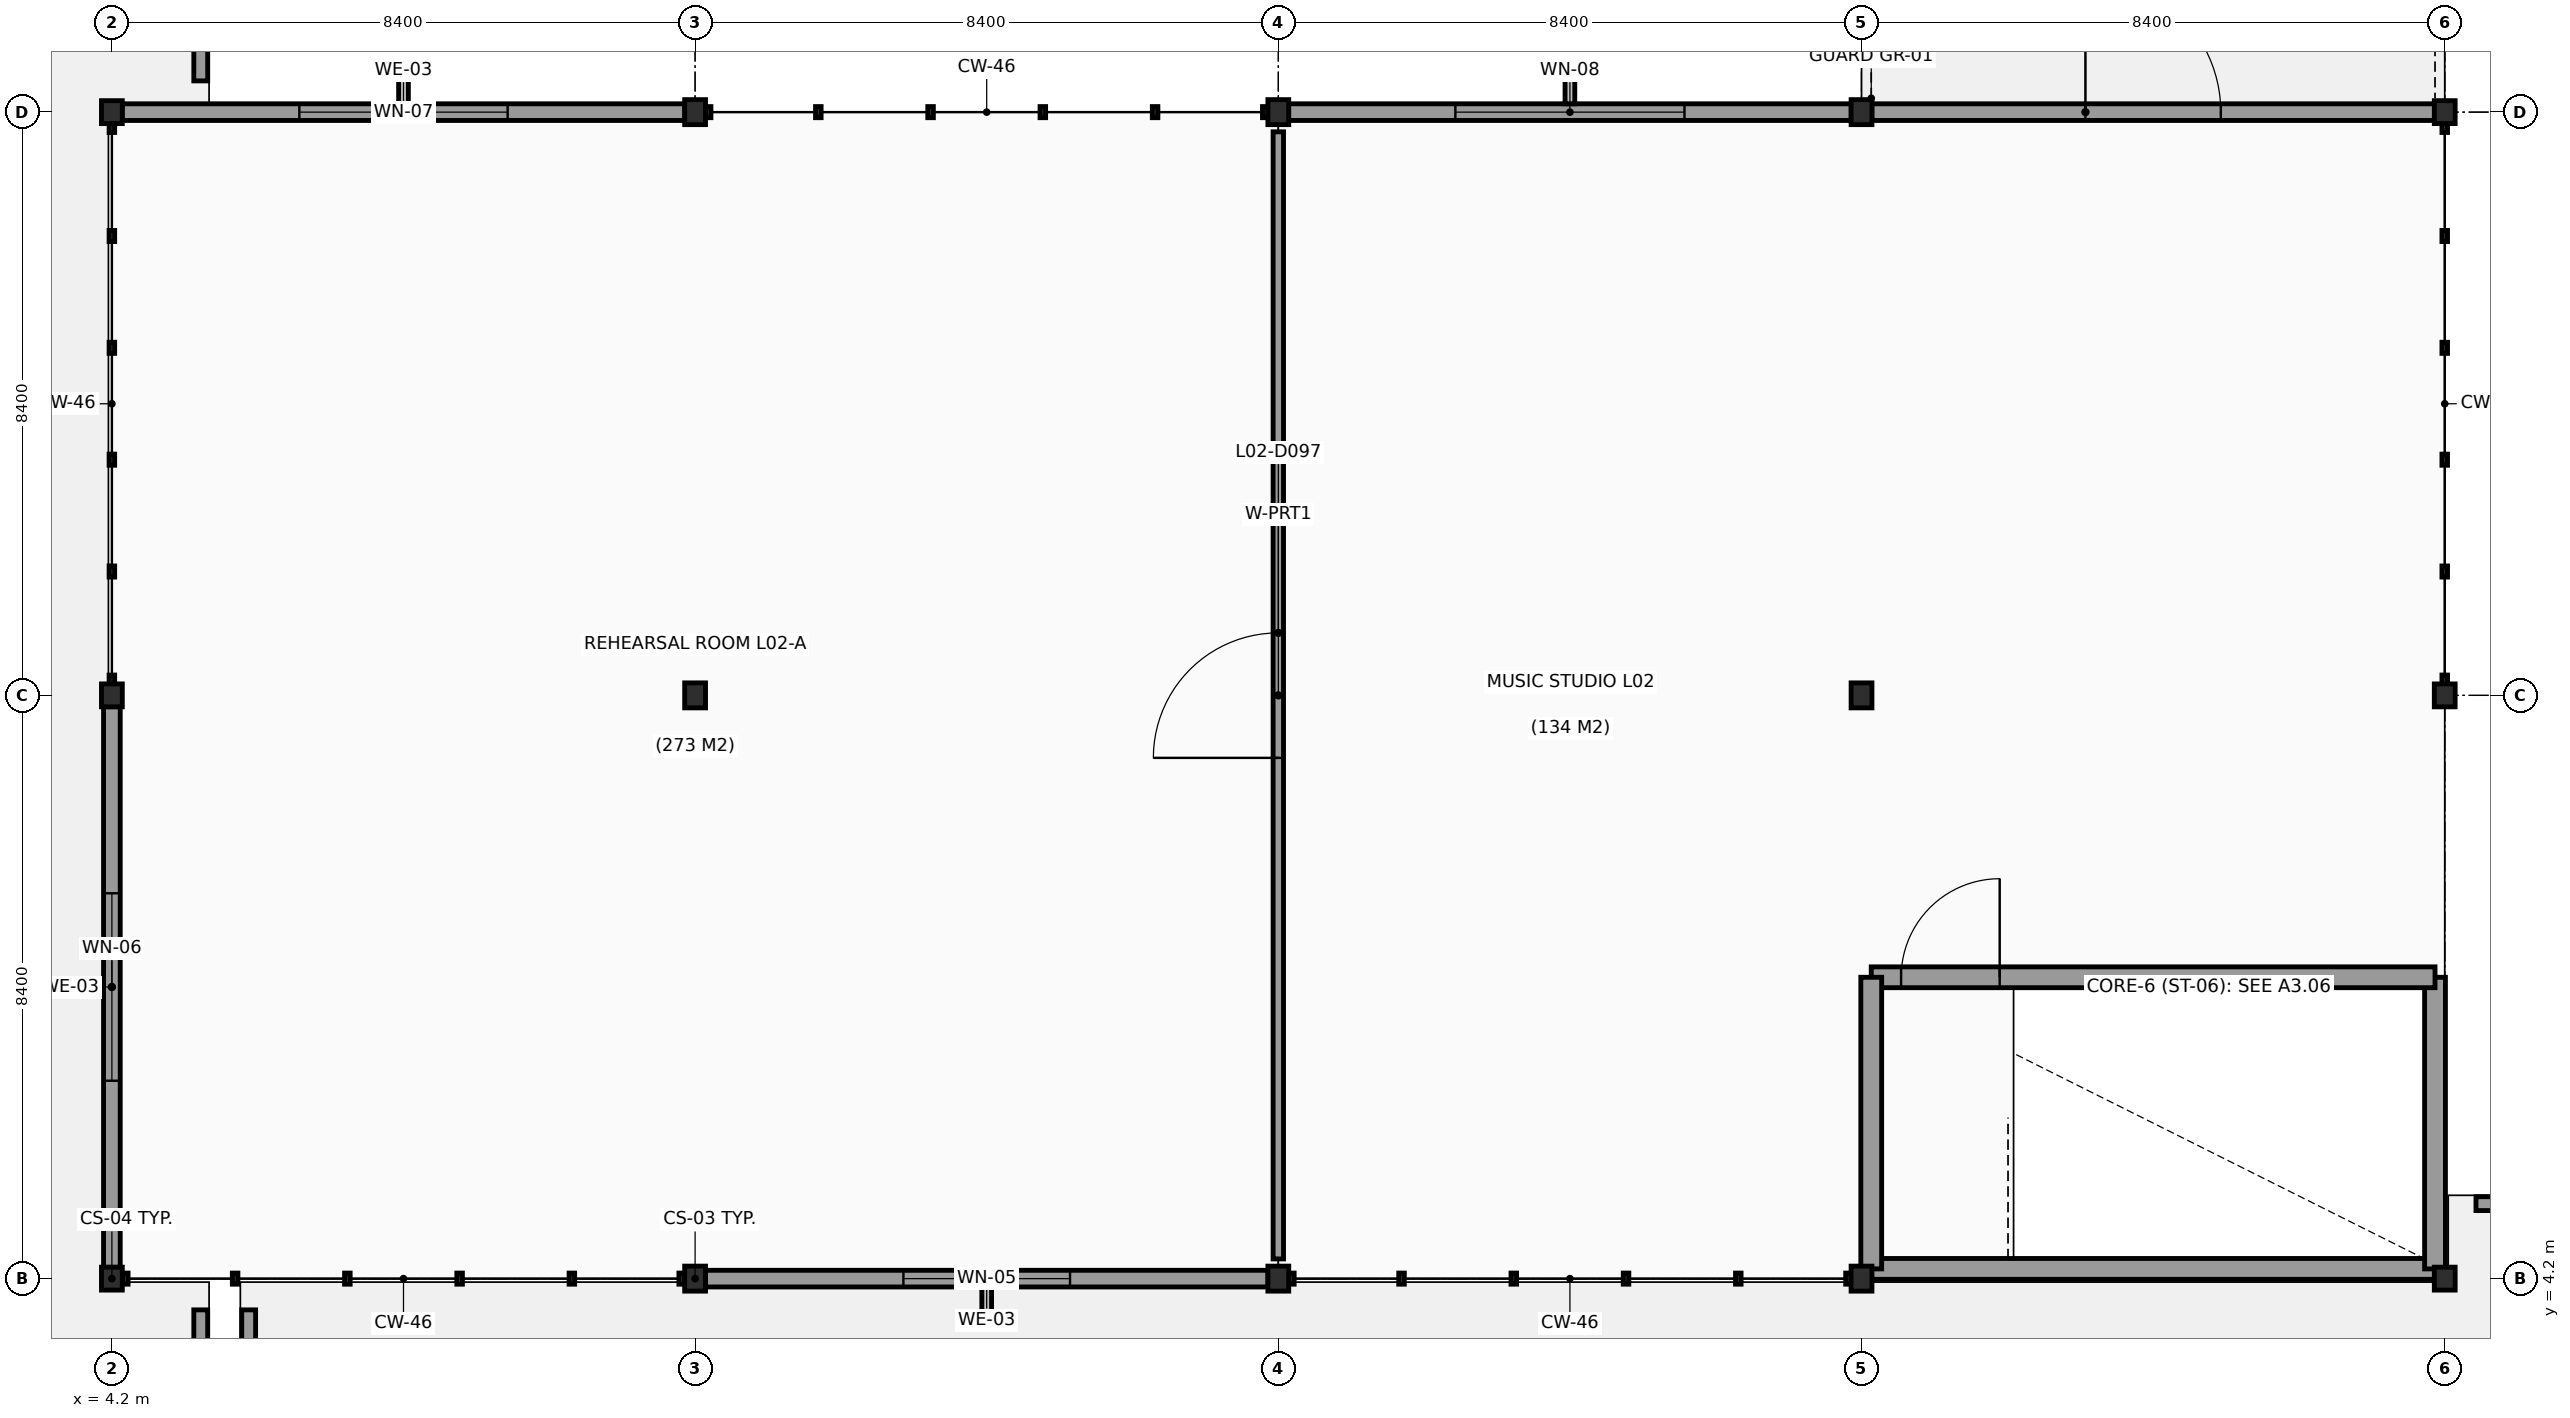
"""IFC4 building model, lengths in metres.
Left out: names, types, materials, properties, quantities, classifications, styles, units other than length and angle.
Written with IfcOpenShell. Run it as: python <this file> out.ifc"""

import sys

from ifc_helpers import new_model, si_unit, direction, frame, frame_2d, origin, origin_2d, place, context, subcontext, project, spatial, rectangle, i_section, extrude, element, fill, save


model = new_model("IFC4")
c1 = context("Model", 3, precision=1e-05, world=origin(), true_north=direction((0.0, 1.0)))
c2 = subcontext(c1, "Body", "Model", "MODEL_VIEW")
j1 = project(units=[si_unit("LENGTHUNIT", "METRE"), si_unit("PLANEANGLEUNIT", "RADIAN")], contexts=[c1])
p1 = place(None, origin())
s1 = spatial("IfcSite", under=j1, at=p1, CompositionType="ELEMENT")
p2 = place(p1, origin())
s2 = spatial("IfcBuilding", under=s1, at=p2, CompositionType="ELEMENT")
p3 = place(p2, frame((0.0, 0.0, 7.8)))
s3 = spatial("IfcBuildingStorey", under=s2, at=p3, CompositionType="ELEMENT", Elevation=7.8)
for number, where, z_axis, x_axis in (
    (1, (4.2, 4.2, 0.0), (0.0, 0.0, 1.0), (1.0, 0.0, 0.0)),
    (2, (4.2, 12.6, 0.0), (0.0, 0.0, 1.0), (1.0, 0.0, 0.0)),
    (3, (4.2, 21.0, 0.0), (0.0, 0.0, 1.0), (1.0, 0.0, 0.0)),
):
    element("IfcColumn", number, at=place(p3, frame(where, z_axis=z_axis, x_axis=x_axis)), inside=s3, PredefinedType="COLUMN", context=c2, shape_type="SweptSolid", body=[
        extrude(i_section(OverallWidth=0.3, OverallDepth=0.33, WebThickness=0.01, FlangeThickness=0.017, FilletRadius=0.027, at=origin_2d()), origin(), (0.0, 0.0, 1.0), 3.34),
    ])
for number, where, z_axis, x_axis in (
    (4, (12.6, 4.2, 0.0), (0.0, 0.0, 1.0), (1.0, 0.0, 0.0)),
    (5, (12.6, 12.6, 0.0), (0.0, 0.0, 1.0), (1.0, 0.0, 0.0)),
    (6, (12.6, 21.0, 0.0), (0.0, 0.0, 1.0), (1.0, 0.0, 0.0)),
    (7, (21.0, 4.2, 0.0), (0.0, 0.0, 1.0), (1.0, 0.0, 0.0)),
    (8, (21.0, 21.0, 0.0), (0.0, 0.0, 1.0), (1.0, 0.0, 0.0)),
    (9, (29.4, 4.2, 0.0), (0.0, 0.0, 1.0), (1.0, 0.0, 0.0)),
    (10, (29.4, 12.6, 0.0), (0.0, 0.0, 1.0), (1.0, 0.0, 0.0)),
    (11, (29.4, 21.0, 0.0), (0.0, 0.0, 1.0), (1.0, 0.0, 0.0)),
):
    element("IfcColumn", number, at=place(p3, frame(where, z_axis=z_axis, x_axis=x_axis)), inside=s3, PredefinedType="COLUMN", context=c2, shape_type="SweptSolid", body=[
        extrude(i_section(OverallWidth=0.3, OverallDepth=0.36, WebThickness=0.012, FlangeThickness=0.022, FilletRadius=0.027, at=origin_2d()), origin(), (0.0, 0.0, 1.0), 3.34),
    ])
for number, where, z_axis, x_axis in (
    (12, (37.8, 4.2, 0.0), (0.0, 0.0, 1.0), (1.0, 0.0, 0.0)),
    (13, (37.8, 12.6, 0.0), (0.0, 0.0, 1.0), (1.0, 0.0, 0.0)),
    (14, (37.8, 21.0, 0.0), (0.0, 0.0, 1.0), (1.0, 0.0, 0.0)),
):
    element("IfcColumn", number, at=place(p3, frame(where, z_axis=z_axis, x_axis=x_axis)), inside=s3, PredefinedType="COLUMN", context=c2, shape_type="SweptSolid", body=[
        extrude(i_section(OverallWidth=0.3, OverallDepth=0.33, WebThickness=0.01, FlangeThickness=0.017, FilletRadius=0.027, at=origin_2d()), origin(), (0.0, 0.0, 1.0), 3.34),
    ])
p4 = place(p3, frame((20.852, 4.2, 0.0), z_axis=(0.0, 0.0, 1.0), x_axis=(-1.0, 0.0, 0.0)))
e15 = element("IfcWall", 15, at=p4, inside=s3, PredefinedType="SOLIDWALL", context=c2, shape_type="SweptSolid", body=[
    extrude(rectangle(XDim=8.104, YDim=0.24, at=frame_2d((4.052, 0.0))), origin(), (0.0, 0.0, 1.0), 3.2),
])
p5 = place(p4, frame((2.852, 0.0, 0.95)))
e16 = element("IfcOpeningElement", 16, at=p5, cuts=e15, PredefinedType="OPENING", context=c2, shape_type="SweptSolid", body=[
    extrude(rectangle(XDim=2.4, YDim=1.2, at=frame_2d((1.2, 0.6))), frame((0.0, 0.13, 0.0), z_axis=(0.0, -1.0, 0.0), x_axis=(1.0, 0.0, 0.0)), (0.0, 0.0, 1.0), 0.26),
])
p6 = place(p3, frame((4.2, 4.363, 0.0), z_axis=(0.0, 0.0, 1.0), x_axis=(0.0, 1.0, 0.0)))
e17 = element("IfcWall", 17, at=p6, inside=s3, PredefinedType="SOLIDWALL", context=c2, shape_type="SweptSolid", body=[
    extrude(rectangle(XDim=8.074, YDim=0.24, at=frame_2d((4.037, 0.0))), origin(), (0.0, 0.0, 1.0), 3.2),
])
p7 = place(p6, frame((2.687, 0.0, 0.95)))
e18 = element("IfcOpeningElement", 18, at=p7, cuts=e17, PredefinedType="OPENING", context=c2, shape_type="SweptSolid", body=[
    extrude(rectangle(XDim=2.7, YDim=1.2, at=frame_2d((1.35, 0.6))), frame((0.0, 0.13, 0.0), z_axis=(0.0, -1.0, 0.0), x_axis=(1.0, 0.0, 0.0)), (0.0, 0.0, 1.0), 0.26),
])
p8 = place(p3, frame((4.348, 21.0, 0.0), z_axis=(0.0, 0.0, 1.0), x_axis=(1.0, 0.0, 0.0)))
e19 = element("IfcWall", 19, at=p8, inside=s3, PredefinedType="SOLIDWALL", context=c2, shape_type="SweptSolid", body=[
    extrude(rectangle(XDim=8.104, YDim=0.24, at=frame_2d((4.052, 0.0))), origin(), (0.0, 0.0, 1.0), 3.2),
])
p9 = place(p8, frame((2.552, 0.0, 0.95)))
e20 = element("IfcOpeningElement", 20, at=p9, cuts=e19, PredefinedType="OPENING", context=c2, shape_type="SweptSolid", body=[
    extrude(rectangle(XDim=3.0, YDim=1.2, at=frame_2d((1.5, 0.6))), frame((0.0, 0.13, 0.0), z_axis=(0.0, -1.0, 0.0), x_axis=(1.0, 0.0, 0.0)), (0.0, 0.0, 1.0), 0.26),
])
p10 = place(p3, frame((21.148, 21.0, 0.0), z_axis=(0.0, 0.0, 1.0), x_axis=(1.0, 0.0, 0.0)))
e21 = element("IfcWall", 21, at=p10, inside=s3, PredefinedType="SOLIDWALL", context=c2, shape_type="SweptSolid", body=[
    extrude(rectangle(XDim=8.104, YDim=0.24, at=frame_2d((4.052, 0.0))), origin(), (0.0, 0.0, 1.0), 3.2),
])
p11 = place(p10, frame((2.402, 0.0, 0.95)))
e22 = element("IfcOpeningElement", 22, at=p11, cuts=e21, PredefinedType="OPENING", context=c2, shape_type="SweptSolid", body=[
    extrude(rectangle(XDim=3.3, YDim=1.2, at=frame_2d((1.65, 0.6))), frame((0.0, 0.13, 0.0), z_axis=(0.0, -1.0, 0.0), x_axis=(1.0, 0.0, 0.0)), (0.0, 0.0, 1.0), 0.26),
])
p12 = place(p3, frame((29.548, 21.0, 0.0), z_axis=(0.0, 0.0, 1.0), x_axis=(1.0, 0.0, 0.0)))
e23 = element("IfcWall", 23, at=p12, inside=s3, PredefinedType="SOLIDWALL", context=c2, shape_type="SweptSolid", body=[
    extrude(rectangle(XDim=8.104, YDim=0.24, at=frame_2d((4.052, 0.0))), origin(), (0.0, 0.0, 1.0), 3.2),
])
p13 = place(p12, frame((3.077, 0.0, 0.0)))
e24 = element("IfcOpeningElement", 24, at=p13, cuts=e23, PredefinedType="OPENING", context=c2, shape_type="SweptSolid", body=[
    extrude(rectangle(XDim=1.95, YDim=2.25, at=frame_2d((0.975, 1.125))), frame((0.0, 0.13, 0.0), z_axis=(0.0, -1.0, 0.0), x_axis=(1.0, 0.0, 0.0)), (0.0, 0.0, 1.0), 0.26),
])
p14 = place(p3, frame((6.17, 0.12, 0.0), z_axis=(0.0, 0.0, 1.0), x_axis=(0.0, 1.0, 0.0)))
e25 = element("IfcWall", 25, at=p14, inside=s3, PredefinedType="PARAPET", context=c2, shape_type="SweptSolid", body=[
    extrude(rectangle(XDim=3.63, YDim=0.2, at=frame_2d((1.815, 0.0))), origin(), (0.0, 0.0, 1.0), 1.1),
])
p15 = place(p3, frame((38.25, 5.28, 0.0), z_axis=(0.0, 0.0, 1.0), x_axis=(1.0, 0.0, 0.0)))
e26 = element("IfcWall", 26, at=p15, inside=s3, PredefinedType="PARAPET", context=c2, shape_type="SweptSolid", body=[
    extrude(rectangle(XDim=35.7, YDim=0.2, at=frame_2d((17.85, 0.0))), origin(), (0.0, 0.0, 1.0), 1.1),
])
p16 = place(p3, frame((5.48, 87.75, 0.0), z_axis=(0.0, 0.0, 1.0), x_axis=(0.0, -1.0, 0.0)))
e27 = element("IfcWall", 27, at=p16, inside=s3, PredefinedType="PARAPET", context=c2, shape_type="SweptSolid", body=[
    extrude(rectangle(XDim=66.3, YDim=0.2, at=frame_2d((33.15, 0.0))), origin(), (0.0, 0.0, 1.0), 1.1),
])
p17 = place(p3, frame((5.48, 3.75, 0.0), z_axis=(0.0, 0.0, 1.0), x_axis=(0.0, -1.0, 0.0)))
e28 = element("IfcWall", 28, at=p17, inside=s3, PredefinedType="PARAPET", context=c2, shape_type="SweptSolid", body=[
    extrude(rectangle(XDim=3.63, YDim=0.2, at=frame_2d((1.815, 0.0))), origin(), (0.0, 0.0, 1.0), 1.1),
])
p18 = place(p3, frame((29.54, 4.34, 0.0), z_axis=(0.0, 0.0, 1.0), x_axis=(1.0, 0.0, 0.0)))
e29 = element("IfcWall", 29, at=p18, inside=s3, PredefinedType="SHEAR", context=c2, shape_type="SweptSolid", body=[
    extrude(rectangle(XDim=8.12, YDim=0.3, at=frame_2d((4.06, 0.0))), origin(), (0.0, 0.0, 1.0), 3.34),
])
p19 = place(p3, frame((37.66, 4.34, 0.0), z_axis=(0.0, 0.0, 1.0), x_axis=(0.0, 1.0, 0.0)))
e30 = element("IfcWall", 30, at=p19, inside=s3, PredefinedType="SHEAR", context=c2, shape_type="SweptSolid", body=[
    extrude(rectangle(XDim=4.2, YDim=0.3, at=frame_2d((2.1, 0.0))), origin(), (0.0, 0.0, 1.0), 3.34),
])
p20 = place(p3, frame((37.66, 8.54, 0.0), z_axis=(0.0, 0.0, 1.0), x_axis=(-1.0, 0.0, 0.0)))
e31 = element("IfcWall", 31, at=p20, inside=s3, PredefinedType="SHEAR", context=c2, shape_type="SweptSolid", body=[
    extrude(rectangle(XDim=8.12, YDim=0.3, at=frame_2d((4.06, 0.0))), origin(), (0.0, 0.0, 1.0), 3.34),
])
p21 = place(p20, frame((6.27, 0.0, 0.0)))
e32 = element("IfcOpeningElement", 32, at=p21, cuts=e31, PredefinedType="OPENING", context=c2, shape_type="SweptSolid", body=[
    extrude(rectangle(XDim=1.42, YDim=2.15, at=frame_2d((0.71, 1.075))), frame((0.0, 0.16, 0.0), z_axis=(0.0, -1.0, 0.0), x_axis=(1.0, 0.0, 0.0)), (0.0, 0.0, 1.0), 0.32),
])
p22 = place(p3, frame((29.54, 8.54, 0.0), z_axis=(0.0, 0.0, 1.0), x_axis=(0.0, -1.0, 0.0)))
e33 = element("IfcWall", 33, at=p22, inside=s3, PredefinedType="SHEAR", context=c2, shape_type="SweptSolid", body=[
    extrude(rectangle(XDim=4.2, YDim=0.3, at=frame_2d((2.1, 0.0))), origin(), (0.0, 0.0, 1.0), 3.34),
])
p23 = place(p3, frame((21.0, 20.716, 0.0), z_axis=(0.0, 0.0, 1.0), x_axis=(0.0, -1.0, 0.0)))
e34 = element("IfcWall", 34, at=p23, inside=s3, PredefinedType="PARTITIONING", context=c2, shape_type="SweptSolid", body=[
    extrude(rectangle(XDim=16.233, YDim=0.15, at=frame_2d((8.116, 0.0))), origin(), (0.0, 0.0, 1.0), 3.34),
])
p24 = place(p23, frame((7.216, 0.0, 0.0)))
e35 = element("IfcOpeningElement", 35, at=p24, cuts=e34, PredefinedType="OPENING", context=c2, shape_type="SweptSolid", body=[
    extrude(rectangle(XDim=1.8, YDim=2.25, at=frame_2d((0.9, 1.125))), frame((0.0, 0.085, 0.0), z_axis=(0.0, -1.0, 0.0), x_axis=(1.0, 0.0, 0.0)), (0.0, 0.0, 1.0), 0.17),
])
p25 = place(p5, origin())
e36 = element("IfcWindow", 36, at=p25, inside=s3, PartitioningType="SINGLE_PANEL", PredefinedType="WINDOW", context=c2, shape_type="SweptSolid", body=[
    extrude(rectangle(XDim=2.4, YDim=1.2, at=frame_2d((1.2, 0.6))), frame((0.0, 0.03, 0.0), z_axis=(0.0, -1.0, 0.0), x_axis=(1.0, 0.0, 0.0)), (0.0, 0.0, 1.0), 0.06),
])
fill(e16, e36)
p26 = place(p7, origin())
e37 = element("IfcWindow", 37, at=p26, inside=s3, PartitioningType="SINGLE_PANEL", PredefinedType="WINDOW", context=c2, shape_type="SweptSolid", body=[
    extrude(rectangle(XDim=2.7, YDim=1.2, at=frame_2d((1.35, 0.6))), frame((0.0, 0.03, 0.0), z_axis=(0.0, -1.0, 0.0), x_axis=(1.0, 0.0, 0.0)), (0.0, 0.0, 1.0), 0.06),
])
fill(e18, e37)
p27 = place(p9, origin())
e38 = element("IfcWindow", 38, at=p27, inside=s3, PartitioningType="SINGLE_PANEL", PredefinedType="WINDOW", context=c2, shape_type="SweptSolid", body=[
    extrude(rectangle(XDim=3.0, YDim=1.2, at=frame_2d((1.5, 0.6))), frame((0.0, 0.03, 0.0), z_axis=(0.0, -1.0, 0.0), x_axis=(1.0, 0.0, 0.0)), (0.0, 0.0, 1.0), 0.06),
])
fill(e20, e38)
p28 = place(p11, origin())
e39 = element("IfcWindow", 39, at=p28, inside=s3, PartitioningType="SINGLE_PANEL", PredefinedType="WINDOW", context=c2, shape_type="SweptSolid", body=[
    extrude(rectangle(XDim=3.3, YDim=1.2, at=frame_2d((1.65, 0.6))), frame((0.0, 0.03, 0.0), z_axis=(0.0, -1.0, 0.0), x_axis=(1.0, 0.0, 0.0)), (0.0, 0.0, 1.0), 0.06),
])
fill(e22, e39)
p29 = place(p13, origin())
e40 = element("IfcDoor", 40, at=p29, inside=s3, OperationType="SINGLE_SWING_LEFT", PredefinedType="DOOR", context=c2, shape_type="SweptSolid", body=[
    extrude(rectangle(XDim=1.95, YDim=2.25, at=frame_2d((0.975, 1.125))), frame((0.0, 0.025, 0.0), z_axis=(0.0, -1.0, 0.0), x_axis=(1.0, 0.0, 0.0)), (0.0, 0.0, 1.0), 0.05),
])
fill(e24, e40)
p30 = place(p21, frame((1.42, 0.0, 0.0), z_axis=(0.0, 0.0, 1.0), x_axis=(-1.0, 0.0, 0.0)))
e41 = element("IfcDoor", 41, at=p30, inside=s3, OperationType="SINGLE_SWING_LEFT", PredefinedType="DOOR", context=c2, shape_type="SweptSolid", body=[
    extrude(rectangle(XDim=1.42, YDim=2.15, at=frame_2d((0.71, 1.075))), frame((0.0, 0.025, 0.0), z_axis=(0.0, -1.0, 0.0), x_axis=(1.0, 0.0, 0.0)), (0.0, 0.0, 1.0), 0.05),
])
fill(e32, e41)
p31 = place(p24, origin())
e42 = element("IfcDoor", 42, at=p31, inside=s3, OperationType="DOUBLE_DOOR_SINGLE_SWING", PredefinedType="DOOR", context=c2, shape_type="SweptSolid", body=[
    extrude(rectangle(XDim=1.8, YDim=2.25, at=frame_2d((0.9, 1.125))), frame((0.0, 0.025, 0.0), z_axis=(0.0, -1.0, 0.0), x_axis=(1.0, 0.0, 0.0)), (0.0, 0.0, 1.0), 0.05),
])
fill(e35, e42)
save(model, sys.argv[1])
